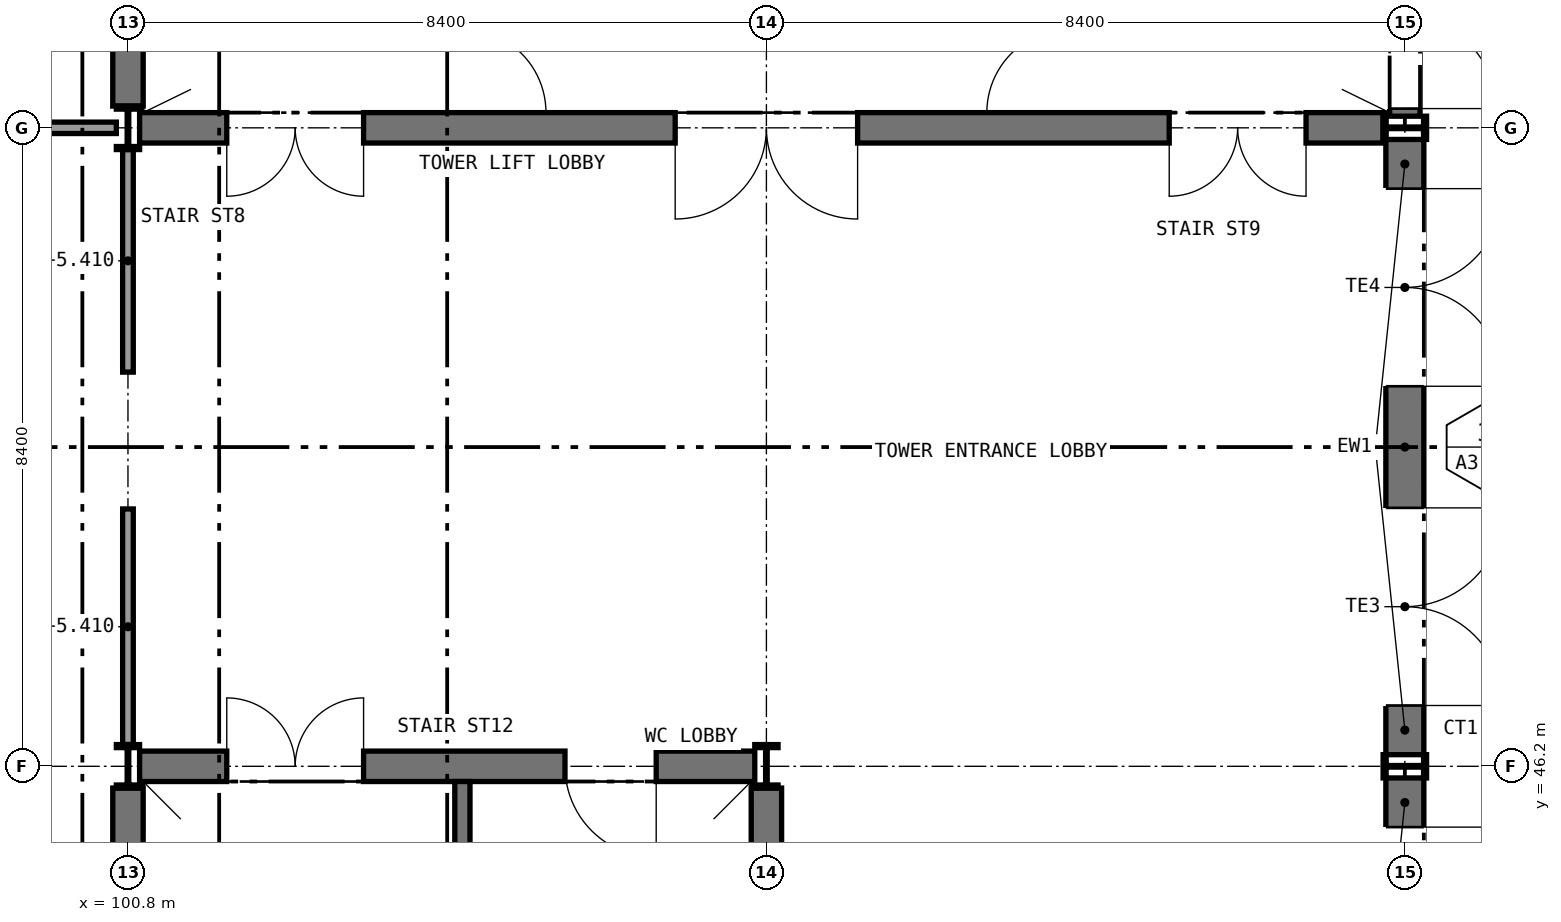
"""IFC4 building model, lengths in metres.
Left out: names, types, materials, properties, quantities, classifications, styles, units other than length and angle.
Written with IfcOpenShell. Run it as: python <this file> out.ifc"""

import sys

from ifc_helpers import new_model, si_unit, direction, frame, frame_2d, origin, origin_2d, place, context, subcontext, project, spatial, rectangle, i_section, extrude, element, fill, save


model = new_model("IFC4")
c1 = context("Model", 3, precision=1e-05, world=origin(), true_north=direction((0.0, 1.0)))
c2 = subcontext(c1, "Body", "Model", "MODEL_VIEW")
j1 = project(units=[si_unit("LENGTHUNIT", "METRE"), si_unit("PLANEANGLEUNIT", "RADIAN")], contexts=[c1])
p1 = place(None, origin())
s1 = spatial("IfcSite", under=j1, at=p1, CompositionType="ELEMENT")
p2 = place(p1, origin())
s2 = spatial("IfcBuilding", under=s1, at=p2, CompositionType="ELEMENT")
p3 = place(p2, origin())
s3 = spatial("IfcBuildingStorey", under=s2, at=p3, CompositionType="ELEMENT", Elevation=0.0)
p4 = place(p3, frame((100.953, 54.6, 0.0), z_axis=(0.0, 0.0, 1.0), x_axis=(1.0, 0.0, 0.0)))
e1 = element("IfcWall", 1, at=p4, inside=s3, PredefinedType="SHEAR", context=c2, shape_type="SweptSolid", body=[
    extrude(rectangle(XDim=16.361, YDim=0.4, at=frame_2d((8.181, 0.0))), origin(), (0.0, 0.0, 1.0), 5.85),
])
p5 = place(p4, frame((13.547, 0.0, 0.0)))
e2 = element("IfcOpeningElement", 2, at=p5, cuts=e1, PredefinedType="OPENING", context=c2, shape_type="SweptSolid", body=[
    extrude(rectangle(XDim=1.8, YDim=2.1, at=frame_2d((0.9, 1.05))), frame((0.0, 0.21, 0.0), z_axis=(0.0, -1.0, 0.0), x_axis=(1.0, 0.0, 0.0)), (0.0, 0.0, 1.0), 0.42),
])
p6 = place(p4, frame((7.047, 0.0, 0.0)))
e3 = element("IfcOpeningElement", 3, at=p6, cuts=e1, PredefinedType="OPENING", context=c2, shape_type="SweptSolid", body=[
    extrude(rectangle(XDim=2.4, YDim=2.4, at=frame_2d((1.2, 1.2))), frame((0.0, 0.21, 0.0), z_axis=(0.0, -1.0, 0.0), x_axis=(1.0, 0.0, 0.0)), (0.0, 0.0, 1.0), 0.42),
])
p7 = place(p4, frame((1.147, 0.0, 0.0)))
e4 = element("IfcOpeningElement", 4, at=p7, cuts=e1, PredefinedType="OPENING", context=c2, shape_type="SweptSolid", body=[
    extrude(rectangle(XDim=1.8, YDim=2.1, at=frame_2d((0.9, 1.05))), frame((0.0, 0.21, 0.0), z_axis=(0.0, -1.0, 0.0), x_axis=(1.0, 0.0, 0.0)), (0.0, 0.0, 1.0), 0.42),
])
p8 = place(p3, frame((100.8, 54.886, 0.0), z_axis=(0.0, 0.0, 1.0), x_axis=(0.0, 1.0, 0.0)))
e5 = element("IfcWall", 5, at=p8, inside=s3, PredefinedType="SHEAR", context=c2, shape_type="SweptSolid", body=[
    extrude(rectangle(XDim=7.828, YDim=0.4, at=frame_2d((3.914, 0.0))), origin(), (0.0, 0.0, 1.0), 5.85),
])
p9 = place(p3, frame((117.6, 54.753, 0.0), z_axis=(0.0, 0.0, 1.0), x_axis=(0.0, 1.0, 0.0)))
e6 = element("IfcWall", 6, at=p9, inside=s3, PredefinedType="SHEAR", context=c2, shape_type="SweptSolid", body=[
    extrude(rectangle(XDim=8.094, YDim=0.4, at=frame_2d((4.047, 0.0))), origin(), (0.0, 0.0, 1.0), 5.85),
])
p10 = place(p9, frame((0.1, 0.0, 0.0)))
e7 = element("IfcOpeningElement", 7, at=p10, cuts=e6, PredefinedType="OPENING", context=c2, shape_type="SweptSolid", body=[
    extrude(rectangle(XDim=1.2, YDim=2.1, at=frame_2d((0.6, 1.05))), frame((0.0, 0.21, 0.0), z_axis=(0.0, -1.0, 0.0), x_axis=(1.0, 0.0, 0.0)), (0.0, 0.0, 1.0), 0.42),
])
p11 = place(p3, frame((100.953, 46.2, 0.0), z_axis=(0.0, 0.0, 1.0), x_axis=(1.0, 0.0, 0.0)))
e8 = element("IfcWall", 8, at=p11, inside=s3, PredefinedType="SHEAR", context=c2, shape_type="SweptSolid", body=[
    extrude(rectangle(XDim=8.094, YDim=0.4, at=frame_2d((4.047, 0.0))), origin(), (0.0, 0.0, 1.0), 5.85),
])
p12 = place(p11, frame((5.597, 0.0, 0.0)))
e9 = element("IfcOpeningElement", 9, at=p12, cuts=e8, PredefinedType="OPENING", context=c2, shape_type="SweptSolid", body=[
    extrude(rectangle(XDim=1.2, YDim=2.1, at=frame_2d((0.6, 1.05))), frame((0.0, 0.21, 0.0), z_axis=(0.0, -1.0, 0.0), x_axis=(1.0, 0.0, 0.0)), (0.0, 0.0, 1.0), 0.42),
])
p13 = place(p11, frame((1.147, 0.0, 0.0)))
e10 = element("IfcOpeningElement", 10, at=p13, cuts=e8, PredefinedType="OPENING", context=c2, shape_type="SweptSolid", body=[
    extrude(rectangle(XDim=1.8, YDim=2.1, at=frame_2d((0.9, 1.05))), frame((0.0, 0.21, 0.0), z_axis=(0.0, -1.0, 0.0), x_axis=(1.0, 0.0, 0.0)), (0.0, 0.0, 1.0), 0.42),
])
for number, where, z_axis, x_axis in (
    (11, (100.8, 38.086, 0.0), (0.0, 0.0, 1.0), (0.0, 1.0, 0.0)),
    (12, (109.2, 38.086, 0.0), (0.0, 0.0, 1.0), (0.0, 1.0, 0.0)),
):
    element("IfcWall", number, at=place(p3, frame(where, z_axis=z_axis, x_axis=x_axis)), inside=s3, PredefinedType="SHEAR", context=c2, shape_type="SweptSolid", body=[
        extrude(rectangle(XDim=7.828, YDim=0.4, at=frame_2d((3.914, 0.0))), origin(), (0.0, 0.0, 1.0), 5.85),
    ])
for number, where, z_axis, x_axis in (
    (13, (100.8, 46.2, 0.0), (0.0, 0.0, 1.0), (1.0, 0.0, 0.0)),
    (14, (100.8, 54.6, 0.0), (0.0, 0.0, 1.0), (1.0, 0.0, 0.0)),
    (15, (109.2, 46.2, 0.0), (0.0, 0.0, 1.0), (1.0, 0.0, 0.0)),
    (16, (117.6, 46.2, 0.0), (0.0, 0.0, 1.0), (0.0, 1.0, 0.0)),
    (17, (117.6, 54.6, 0.0), (0.0, 0.0, 1.0), (0.0, 1.0, 0.0)),
):
    element("IfcColumn", number, at=place(p3, frame(where, z_axis=z_axis, x_axis=x_axis)), inside=s3, PredefinedType="COLUMN", context=c2, shape_type="SweptSolid", body=[
        extrude(i_section(OverallWidth=0.306, OverallDepth=0.572, WebThickness=0.021, FlangeThickness=0.04, FilletRadius=0.027, at=origin_2d()), origin(), (0.0, 0.0, 1.0), 6.0),
    ])
p14 = place(p3, frame((92.553, 54.6, 0.0), z_axis=(0.0, 0.0, 1.0), x_axis=(1.0, 0.0, 0.0)))
e18 = element("IfcWall", 18, at=p14, inside=s3, PredefinedType="SOLIDWALL", context=c2, shape_type="SweptSolid", body=[
    extrude(rectangle(XDim=8.094, YDim=0.15, at=frame_2d((4.047, 0.0))), origin(), (0.0, 0.0, 1.0), 5.52),
])
p15 = place(p14, frame((3.35, 0.0, 0.0)))
e19 = element("IfcOpeningElement", 19, at=p15, cuts=e18, PredefinedType="OPENING", context=c2, shape_type="SweptSolid", body=[
    extrude(rectangle(XDim=1.5, YDim=2.1, at=frame_2d((0.75, 1.05))), frame((0.0, 0.085, 0.0), z_axis=(0.0, -1.0, 0.0), x_axis=(1.0, 0.0, 0.0)), (0.0, 0.0, 1.0), 0.17),
])
p16 = place(p3, frame((100.8, 46.486, 0.0), z_axis=(0.0, 0.0, 1.0), x_axis=(0.0, 1.0, 0.0)))
e20 = element("IfcWall", 20, at=p16, inside=s3, PredefinedType="PARTITIONING", context=c2, shape_type="SweptSolid", body=[
    extrude(rectangle(XDim=3.1, YDim=0.14, at=frame_2d((1.55, 0.0))), origin(), (0.0, 0.0, 1.0), 5.41),
])
p17 = place(p3, frame((100.8, 51.386, 0.0), z_axis=(0.0, 0.0, 1.0), x_axis=(0.0, 1.0, 0.0)))
e21 = element("IfcWall", 21, at=p17, inside=s3, PredefinedType="PARTITIONING", context=c2, shape_type="SweptSolid", body=[
    extrude(rectangle(XDim=2.928, YDim=0.14, at=frame_2d((1.464, 0.0))), origin(), (0.0, 0.0, 1.0), 5.41),
])
p18 = place(p3, frame((117.6, 37.953, 0.0), z_axis=(0.0, 0.0, 1.0), x_axis=(0.0, 1.0, 0.0)))
e22 = element("IfcWall", 22, at=p18, inside=s3, PredefinedType="STANDARD", context=c2, shape_type="SweptSolid", body=[
    extrude(rectangle(XDim=8.094, YDim=0.5, at=frame_2d((4.047, 0.0))), origin(), (0.0, 0.0, 1.0), 5.85),
])
p19 = place(p18, frame((0.647, 0.0, 0.0)))
e23 = element("IfcOpeningElement", 23, at=p19, cuts=e22, PredefinedType="OPENING", context=c2, shape_type="SweptSolid", body=[
    extrude(rectangle(XDim=2.6, YDim=3.3, at=frame_2d((1.3, 1.65))), frame((0.0, 0.26, 0.0), z_axis=(0.0, -1.0, 0.0), x_axis=(1.0, 0.0, 0.0)), (0.0, 0.0, 1.0), 0.52),
])
p20 = place(p18, frame((4.847, 0.0, 0.0)))
e24 = element("IfcOpeningElement", 24, at=p20, cuts=e22, PredefinedType="OPENING", context=c2, shape_type="SweptSolid", body=[
    extrude(rectangle(XDim=2.6, YDim=3.3, at=frame_2d((1.3, 1.65))), frame((0.0, 0.26, 0.0), z_axis=(0.0, -1.0, 0.0), x_axis=(1.0, 0.0, 0.0)), (0.0, 0.0, 1.0), 0.52),
])
p21 = place(p3, frame((117.6, 46.353, 0.0), z_axis=(0.0, 0.0, 1.0), x_axis=(0.0, 1.0, 0.0)))
e25 = element("IfcWall", 25, at=p21, inside=s3, PredefinedType="STANDARD", context=c2, shape_type="SweptSolid", body=[
    extrude(rectangle(XDim=8.094, YDim=0.5, at=frame_2d((4.047, 0.0))), origin(), (0.0, 0.0, 1.0), 5.85),
])
p22 = place(p21, frame((0.647, 0.0, 0.0)))
e26 = element("IfcOpeningElement", 26, at=p22, cuts=e25, PredefinedType="OPENING", context=c2, shape_type="SweptSolid", body=[
    extrude(rectangle(XDim=2.6, YDim=3.3, at=frame_2d((1.3, 1.65))), frame((0.0, 0.26, 0.0), z_axis=(0.0, -1.0, 0.0), x_axis=(1.0, 0.0, 0.0)), (0.0, 0.0, 1.0), 0.52),
])
p23 = place(p21, frame((4.847, 0.0, 0.0)))
e27 = element("IfcOpeningElement", 27, at=p23, cuts=e25, PredefinedType="OPENING", context=c2, shape_type="SweptSolid", body=[
    extrude(rectangle(XDim=2.6, YDim=3.3, at=frame_2d((1.3, 1.65))), frame((0.0, 0.26, 0.0), z_axis=(0.0, -1.0, 0.0), x_axis=(1.0, 0.0, 0.0)), (0.0, 0.0, 1.0), 0.52),
])
p24 = place(p3, frame((105.2, 62.8, 0.0), z_axis=(0.0, 0.0, 1.0), x_axis=(0.0, -1.0, 0.0)))
e28 = element("IfcWall", 28, at=p24, inside=s3, PredefinedType="SHEAR", context=c2, shape_type="SweptSolid", body=[
    extrude(rectangle(XDim=8.0, YDim=0.2, at=frame_2d((4.0, 0.0))), origin(), (0.0, 0.0, 1.0), 5.85),
])
p25 = place(p24, frame((6.9, 0.0, 0.0)))
e29 = element("IfcOpeningElement", 29, at=p25, cuts=e28, PredefinedType="OPENING", context=c2, shape_type="SweptSolid", body=[
    extrude(rectangle(XDim=1.11, YDim=2.1, at=frame_2d((0.555, 1.05))), frame((0.0, 0.11, 0.0), z_axis=(0.0, -1.0, 0.0), x_axis=(1.0, 0.0, 0.0)), (0.0, 0.0, 1.0), 0.22),
])
p26 = place(p3, frame((113.2, 62.8, 0.0), z_axis=(0.0, 0.0, 1.0), x_axis=(0.0, -1.0, 0.0)))
e30 = element("IfcWall", 30, at=p26, inside=s3, PredefinedType="SHEAR", context=c2, shape_type="SweptSolid", body=[
    extrude(rectangle(XDim=8.0, YDim=0.2, at=frame_2d((4.0, 0.0))), origin(), (0.0, 0.0, 1.0), 5.85),
])
p27 = place(p26, frame((6.9, 0.0, 0.0)))
e31 = element("IfcOpeningElement", 31, at=p27, cuts=e30, PredefinedType="OPENING", context=c2, shape_type="SweptSolid", body=[
    extrude(rectangle(XDim=1.11, YDim=2.1, at=frame_2d((0.555, 1.05))), frame((0.0, 0.11, 0.0), z_axis=(0.0, -1.0, 0.0), x_axis=(1.0, 0.0, 0.0)), (0.0, 0.0, 1.0), 0.22),
])
p28 = place(p3, frame((105.2, 38.0, 0.0), z_axis=(0.0, 0.0, 1.0), x_axis=(0.0, 1.0, 0.0)))
e32 = element("IfcWall", 32, at=p28, inside=s3, PredefinedType="SHEAR", context=c2, shape_type="SweptSolid", body=[
    extrude(rectangle(XDim=8.0, YDim=0.2, at=frame_2d((4.0, 0.0))), origin(), (0.0, 0.0, 1.0), 5.85),
])
p29 = place(p20, frame((2.6, 0.0, 0.0), z_axis=(0.0, 0.0, 1.0), x_axis=(-1.0, 0.0, 0.0)))
e33 = element("IfcDoor", 33, at=p29, inside=s3, OperationType="DOUBLE_DOOR_SINGLE_SWING", PredefinedType="DOOR", context=c2, shape_type="SweptSolid", body=[
    extrude(rectangle(XDim=2.6, YDim=3.3, at=frame_2d((1.3, 1.65))), frame((0.0, 0.025, 0.0), z_axis=(0.0, -1.0, 0.0), x_axis=(1.0, 0.0, 0.0)), (0.0, 0.0, 1.0), 0.05),
])
fill(e24, e33)
p30 = place(p22, frame((2.6, 0.0, 0.0), z_axis=(0.0, 0.0, 1.0), x_axis=(-1.0, 0.0, 0.0)))
e34 = element("IfcDoor", 34, at=p30, inside=s3, OperationType="DOUBLE_DOOR_SINGLE_SWING", PredefinedType="DOOR", context=c2, shape_type="SweptSolid", body=[
    extrude(rectangle(XDim=2.6, YDim=3.3, at=frame_2d((1.3, 1.65))), frame((0.0, 0.025, 0.0), z_axis=(0.0, -1.0, 0.0), x_axis=(1.0, 0.0, 0.0)), (0.0, 0.0, 1.0), 0.05),
])
fill(e26, e34)
p31 = place(p23, frame((2.6, 0.0, 0.0), z_axis=(0.0, 0.0, 1.0), x_axis=(-1.0, 0.0, 0.0)))
e35 = element("IfcDoor", 35, at=p31, inside=s3, OperationType="DOUBLE_DOOR_SINGLE_SWING", PredefinedType="DOOR", context=c2, shape_type="SweptSolid", body=[
    extrude(rectangle(XDim=2.6, YDim=3.3, at=frame_2d((1.3, 1.65))), frame((0.0, 0.025, 0.0), z_axis=(0.0, -1.0, 0.0), x_axis=(1.0, 0.0, 0.0)), (0.0, 0.0, 1.0), 0.05),
])
fill(e27, e35)
p32 = place(p25, origin())
e36 = element("IfcDoor", 36, at=p32, inside=s3, OperationType="SINGLE_SWING_RIGHT", PredefinedType="DOOR", context=c2, shape_type="SweptSolid", body=[
    extrude(rectangle(XDim=1.1, YDim=2.1, at=frame_2d((0.55, 1.05))), frame((0.0, 0.025, 0.0), z_axis=(0.0, -1.0, 0.0), x_axis=(1.0, 0.0, 0.0)), (0.0, 0.0, 1.0), 0.05),
])
fill(e29, e36)
p33 = place(p27, frame((1.1, 0.0, 0.0), z_axis=(0.0, 0.0, 1.0), x_axis=(-1.0, 0.0, 0.0)))
e37 = element("IfcDoor", 37, at=p33, inside=s3, OperationType="SINGLE_SWING_LEFT", PredefinedType="DOOR", context=c2, shape_type="SweptSolid", body=[
    extrude(rectangle(XDim=1.1, YDim=2.1, at=frame_2d((0.55, 1.05))), frame((0.0, 0.025, 0.0), z_axis=(0.0, -1.0, 0.0), x_axis=(1.0, 0.0, 0.0)), (0.0, 0.0, 1.0), 0.05),
])
fill(e31, e37)
p34 = place(p5, frame((1.8, 0.0, 0.0), z_axis=(0.0, 0.0, 1.0), x_axis=(-1.0, 0.0, 0.0)))
e38 = element("IfcDoor", 38, at=p34, inside=s3, OperationType="DOUBLE_DOOR_SINGLE_SWING", PredefinedType="DOOR", context=c2, shape_type="SweptSolid", body=[
    extrude(rectangle(XDim=1.8, YDim=2.1, at=frame_2d((0.9, 1.05))), frame((0.0, 0.025, 0.0), z_axis=(0.0, -1.0, 0.0), x_axis=(1.0, 0.0, 0.0)), (0.0, 0.0, 1.0), 0.05),
])
fill(e2, e38)
p35 = place(p6, frame((2.4, 0.0, 0.0), z_axis=(0.0, 0.0, 1.0), x_axis=(-1.0, 0.0, 0.0)))
e39 = element("IfcDoor", 39, at=p35, inside=s3, OperationType="DOUBLE_DOOR_SINGLE_SWING", PredefinedType="DOOR", context=c2, shape_type="SweptSolid", body=[
    extrude(rectangle(XDim=2.4, YDim=2.4, at=frame_2d((1.2, 1.2))), frame((0.0, 0.025, 0.0), z_axis=(0.0, -1.0, 0.0), x_axis=(1.0, 0.0, 0.0)), (0.0, 0.0, 1.0), 0.05),
])
fill(e3, e39)
p36 = place(p12, frame((1.2, 0.0, 0.0), z_axis=(0.0, 0.0, 1.0), x_axis=(-1.0, 0.0, 0.0)))
e40 = element("IfcDoor", 40, at=p36, inside=s3, OperationType="SINGLE_SWING_LEFT", PredefinedType="DOOR", context=c2, shape_type="SweptSolid", body=[
    extrude(rectangle(XDim=1.2, YDim=2.1, at=frame_2d((0.6, 1.05))), frame((0.0, 0.025, 0.0), z_axis=(0.0, -1.0, 0.0), x_axis=(1.0, 0.0, 0.0)), (0.0, 0.0, 1.0), 0.05),
])
fill(e9, e40)
p37 = place(p7, frame((1.8, 0.0, 0.0), z_axis=(0.0, 0.0, 1.0), x_axis=(-1.0, 0.0, 0.0)))
e41 = element("IfcDoor", 41, at=p37, inside=s3, OperationType="DOUBLE_DOOR_SINGLE_SWING", PredefinedType="DOOR", context=c2, shape_type="SweptSolid", body=[
    extrude(rectangle(XDim=1.8, YDim=2.1, at=frame_2d((0.9, 1.05))), frame((0.0, 0.025, 0.0), z_axis=(0.0, -1.0, 0.0), x_axis=(1.0, 0.0, 0.0)), (0.0, 0.0, 1.0), 0.05),
])
fill(e4, e41)
p38 = place(p10, frame((1.2, 0.0, 0.0), z_axis=(0.0, 0.0, 1.0), x_axis=(-1.0, 0.0, 0.0)))
e42 = element("IfcDoor", 42, at=p38, inside=s3, OperationType="SINGLE_SWING_RIGHT", PredefinedType="DOOR", context=c2, shape_type="SweptSolid", body=[
    extrude(rectangle(XDim=1.2, YDim=2.1, at=frame_2d((0.6, 1.05))), frame((0.0, 0.025, 0.0), z_axis=(0.0, -1.0, 0.0), x_axis=(1.0, 0.0, 0.0)), (0.0, 0.0, 1.0), 0.05),
])
fill(e7, e42)
p39 = place(p13, origin())
e43 = element("IfcDoor", 43, at=p39, inside=s3, OperationType="DOUBLE_DOOR_SINGLE_SWING", PredefinedType="DOOR", context=c2, shape_type="SweptSolid", body=[
    extrude(rectangle(XDim=1.8, YDim=2.1, at=frame_2d((0.9, 1.05))), frame((0.0, 0.025, 0.0), z_axis=(0.0, -1.0, 0.0), x_axis=(1.0, 0.0, 0.0)), (0.0, 0.0, 1.0), 0.05),
])
fill(e10, e43)
save(model, sys.argv[1])
